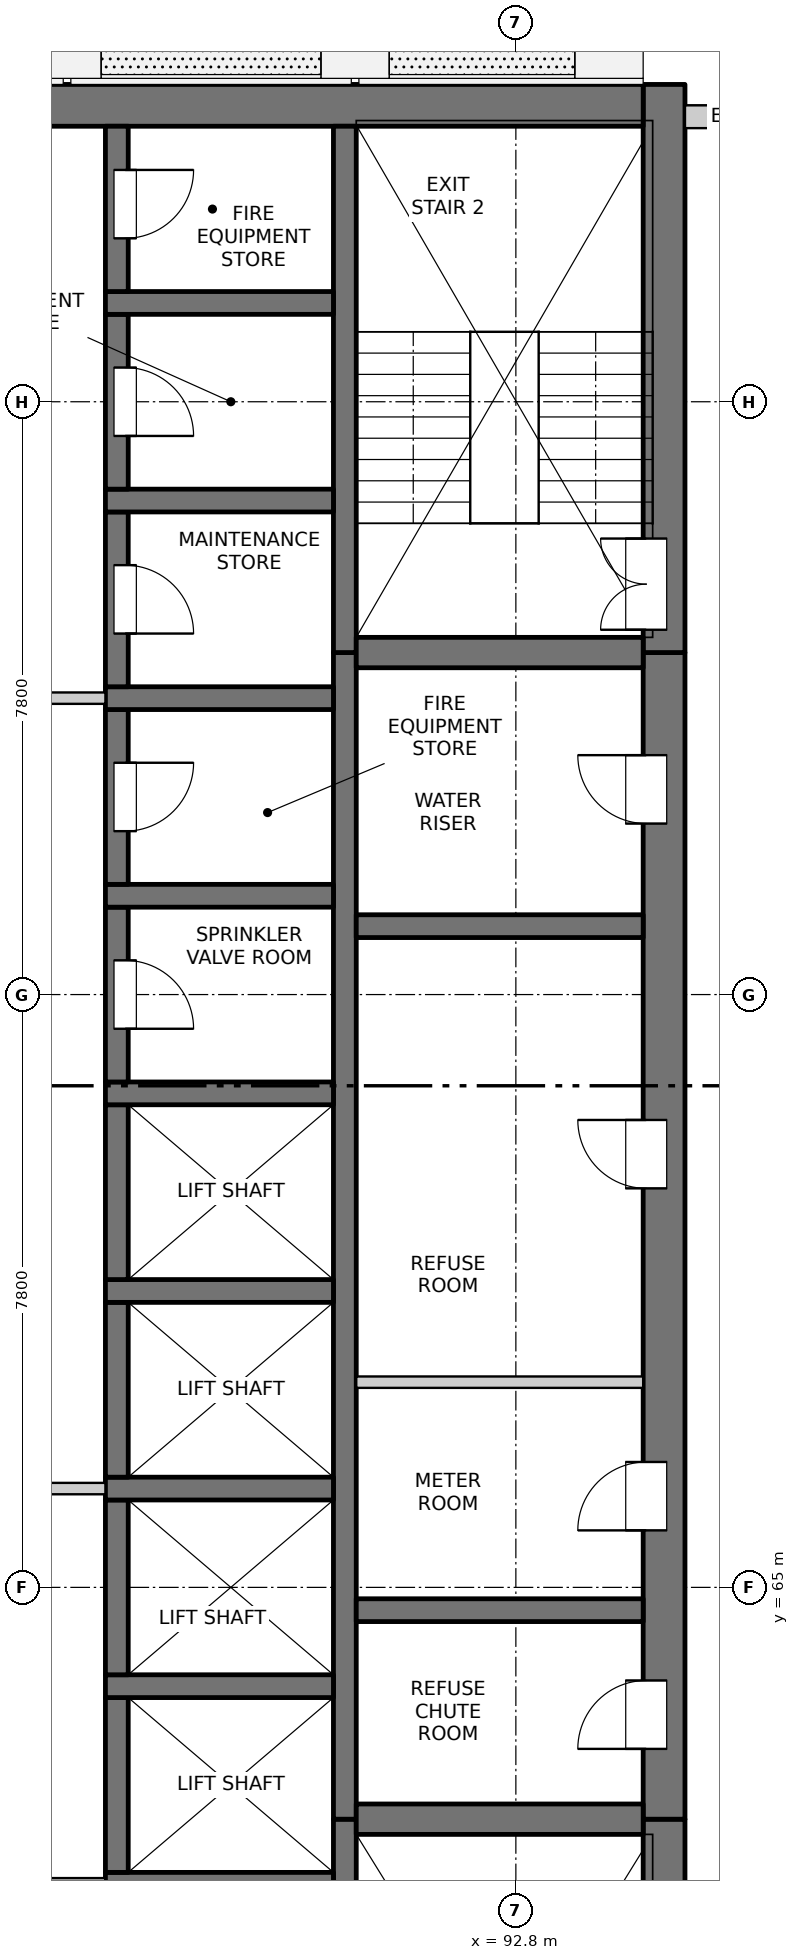
"""IFC4 building model, lengths in metres.
Left out: names, types, materials, properties, quantities, classifications, styles, units other than length and angle.
Written with IfcOpenShell. Run it as: python <this file> out.ifc"""

import sys

from ifc_helpers import new_model, si_unit, direction, frame, frame_2d, origin, place, context, subcontext, project, spatial, rectangle, extrude, element, fill, save


model = new_model("IFC4")
c1 = context("Model", 3, precision=1e-05, world=origin(), true_north=direction((0.0, 1.0)))
c2 = subcontext(c1, "Body", "Model", "MODEL_VIEW")
j1 = project(units=[si_unit("LENGTHUNIT", "METRE"), si_unit("PLANEANGLEUNIT", "RADIAN")], contexts=[c1])
p1 = place(None, origin())
s1 = spatial("IfcSite", under=j1, at=p1, CompositionType="ELEMENT")
p2 = place(p1, origin())
s2 = spatial("IfcBuilding", under=s1, at=p2, CompositionType="ELEMENT")
p3 = place(p2, frame((0.0, 0.0, 110.1)))
s3 = spatial("IfcBuildingStorey", under=s2, at=p3, CompositionType="ELEMENT", Elevation=110.1)
p4 = place(p3, frame((94.75, 54.975, -0.25), z_axis=(0.0, 0.0, 1.0), x_axis=(0.0, 1.0, 0.0)))
e1 = element("IfcWall", 1, at=p4, inside=s3, PredefinedType="SOLIDWALL", context=c2, shape_type="SweptSolid", body=[
    extrude(rectangle(XDim=6.975, YDim=0.55, at=frame_2d((3.487, 0.0))), origin(), (0.0, 0.0, 1.0), 3.4),
])
p5 = place(p4, frame((0.675, 0.0, 0.25)))
e2 = element("IfcOpeningElement", 2, at=p5, cuts=e1, PredefinedType="OPENING", context=c2, shape_type="SweptSolid", body=[
    extrude(rectangle(XDim=1.2, YDim=2.1, at=frame_2d((0.6, 1.05))), frame((0.0, 0.285, 0.0), z_axis=(0.0, -1.0, 0.0), x_axis=(1.0, 0.0, 0.0)), (0.0, 0.0, 1.0), 0.57),
])
p6 = place(p3, frame((94.75, 61.95, -0.25), z_axis=(0.0, 0.0, 1.0), x_axis=(0.0, 1.0, 0.0)))
e3 = element("IfcWall", 3, at=p6, inside=s3, PredefinedType="SOLIDWALL", context=c2, shape_type="SweptSolid", body=[
    extrude(rectangle(XDim=15.35, YDim=0.55, at=frame_2d((7.675, 0.0))), origin(), (0.0, 0.0, 1.0), 3.4),
])
p7 = place(p6, frame((0.925, 0.0, 0.25)))
e4 = element("IfcOpeningElement", 4, at=p7, cuts=e3, PredefinedType="OPENING", context=c2, shape_type="SweptSolid", body=[
    extrude(rectangle(XDim=0.9, YDim=2.1, at=frame_2d((0.45, 1.05))), frame((0.0, 0.285, 0.0), z_axis=(0.0, -1.0, 0.0), x_axis=(1.0, 0.0, 0.0)), (0.0, 0.0, 1.0), 0.57),
])
p8 = place(p6, frame((3.8, 0.0, 0.25)))
e5 = element("IfcOpeningElement", 5, at=p8, cuts=e3, PredefinedType="OPENING", context=c2, shape_type="SweptSolid", body=[
    extrude(rectangle(XDim=0.9, YDim=2.1, at=frame_2d((0.45, 1.05))), frame((0.0, 0.285, 0.0), z_axis=(0.0, -1.0, 0.0), x_axis=(1.0, 0.0, 0.0)), (0.0, 0.0, 1.0), 0.57),
])
p9 = place(p6, frame((8.3, 0.0, 0.25)))
e6 = element("IfcOpeningElement", 6, at=p9, cuts=e3, PredefinedType="OPENING", context=c2, shape_type="SweptSolid", body=[
    extrude(rectangle(XDim=0.9, YDim=2.1, at=frame_2d((0.45, 1.05))), frame((0.0, 0.285, 0.0), z_axis=(0.0, -1.0, 0.0), x_axis=(1.0, 0.0, 0.0)), (0.0, 0.0, 1.0), 0.57),
])
p10 = place(p6, frame((13.1, 0.0, 0.25)))
e7 = element("IfcOpeningElement", 7, at=p10, cuts=e3, PredefinedType="OPENING", context=c2, shape_type="SweptSolid", body=[
    extrude(rectangle(XDim=0.9, YDim=2.1, at=frame_2d((0.45, 1.05))), frame((0.0, 0.285, 0.0), z_axis=(0.0, -1.0, 0.0), x_axis=(1.0, 0.0, 0.0)), (0.0, 0.0, 1.0), 0.57),
])
p11 = place(p3, frame((94.75, 77.3, -0.25), z_axis=(0.0, 0.0, 1.0), x_axis=(0.0, 1.0, 0.0)))
e8 = element("IfcWall", 8, at=p11, inside=s3, PredefinedType="SOLIDWALL", context=c2, shape_type="SweptSolid", body=[
    extrude(rectangle(XDim=7.475, YDim=0.55, at=frame_2d((3.737, 0.0))), origin(), (0.0, 0.0, 1.0), 3.4),
])
p12 = place(p11, frame((0.3, 0.0, 0.25)))
e9 = element("IfcOpeningElement", 9, at=p12, cuts=e8, PredefinedType="OPENING", context=c2, shape_type="SweptSolid", body=[
    extrude(rectangle(XDim=1.2, YDim=2.1, at=frame_2d((0.6, 1.05))), frame((0.0, 0.285, 0.0), z_axis=(0.0, -1.0, 0.0), x_axis=(1.0, 0.0, 0.0)), (0.0, 0.0, 1.0), 0.57),
])
p13 = place(p3, frame((75.525, 84.5, -0.25), z_axis=(0.0, 0.0, 1.0), x_axis=(1.0, 0.0, 0.0)))
e10 = element("IfcWall", 10, at=p13, inside=s3, PredefinedType="SOLIDWALL", context=c2, shape_type="SweptSolid", body=[
    extrude(rectangle(XDim=18.95, YDim=0.55, at=frame_2d((9.475, 0.0))), origin(), (0.0, 0.0, 1.0), 3.4),
])
p14 = place(p3, frame((90.55, 55.525, -0.25), z_axis=(0.0, 0.0, 1.0), x_axis=(0.0, 1.0, 0.0)))
e11 = element("IfcWall", 11, at=p14, inside=s3, PredefinedType="SOLIDWALL", context=c2, shape_type="SweptSolid", body=[
    extrude(rectangle(XDim=6.425, YDim=0.3, at=frame_2d((3.212, 0.0))), origin(), (0.0, 0.0, 1.0), 3.4),
])
p15 = place(p14, frame((0.125, 0.0, 0.25)))
e12 = element("IfcOpeningElement", 12, at=p15, cuts=e11, PredefinedType="OPENING", context=c2, shape_type="SweptSolid", body=[
    extrude(rectangle(XDim=1.2, YDim=2.1, at=frame_2d((0.6, 1.05))), frame((0.0, 0.16, 0.0), z_axis=(0.0, -1.0, 0.0), x_axis=(1.0, 0.0, 0.0)), (0.0, 0.0, 1.0), 0.32),
])
p16 = place(p3, frame((90.55, 61.95, -0.25), z_axis=(0.0, 0.0, 1.0), x_axis=(0.0, 1.0, 0.0)))
e13 = element("IfcWall", 13, at=p16, inside=s3, PredefinedType="SOLIDWALL", context=c2, shape_type="SweptSolid", body=[
    extrude(rectangle(XDim=15.35, YDim=0.3, at=frame_2d((7.675, 0.0))), origin(), (0.0, 0.0, 1.0), 3.4),
])
p17 = place(p3, frame((90.55, 77.3, -0.25), z_axis=(0.0, 0.0, 1.0), x_axis=(0.0, 1.0, 0.0)))
e14 = element("IfcWall", 14, at=p17, inside=s3, PredefinedType="SOLIDWALL", context=c2, shape_type="SweptSolid", body=[
    extrude(rectangle(XDim=6.925, YDim=0.3, at=frame_2d((3.462, 0.0))), origin(), (0.0, 0.0, 1.0), 3.4),
])
p18 = place(p3, frame((87.4, 61.1, -0.25), z_axis=(0.0, 0.0, 1.0), x_axis=(1.0, 0.0, 0.0)))
e15 = element("IfcWall", 15, at=p18, inside=s3, PredefinedType="SOLIDWALL", context=c2, shape_type="SweptSolid", body=[
    extrude(rectangle(XDim=3.0, YDim=0.3, at=frame_2d((1.5, 0.0))), origin(), (0.0, 0.0, 1.0), 3.4),
])
p19 = place(p3, frame((87.55, 61.25, -0.25), z_axis=(0.0, 0.0, 1.0), x_axis=(0.0, 1.0, 0.0)))
e16 = element("IfcWall", 16, at=p19, inside=s3, PredefinedType="SOLIDWALL", context=c2, shape_type="SweptSolid", body=[
    extrude(rectangle(XDim=2.3, YDim=0.3, at=frame_2d((1.15, 0.0))), origin(), (0.0, 0.0, 1.0), 3.4),
])
p20 = place(p3, frame((87.4, 63.7, -0.25), z_axis=(0.0, 0.0, 1.0), x_axis=(1.0, 0.0, 0.0)))
e17 = element("IfcWall", 17, at=p20, inside=s3, PredefinedType="SOLIDWALL", context=c2, shape_type="SweptSolid", body=[
    extrude(rectangle(XDim=3.0, YDim=0.3, at=frame_2d((1.5, 0.0))), origin(), (0.0, 0.0, 1.0), 3.4),
])
p21 = place(p3, frame((87.55, 63.85, -0.25), z_axis=(0.0, 0.0, 1.0), x_axis=(0.0, 1.0, 0.0)))
e18 = element("IfcWall", 18, at=p21, inside=s3, PredefinedType="SOLIDWALL", context=c2, shape_type="SweptSolid", body=[
    extrude(rectangle(XDim=2.3, YDim=0.3, at=frame_2d((1.15, 0.0))), origin(), (0.0, 0.0, 1.0), 3.4),
])
p22 = place(p3, frame((87.4, 66.3, -0.25), z_axis=(0.0, 0.0, 1.0), x_axis=(1.0, 0.0, 0.0)))
e19 = element("IfcWall", 19, at=p22, inside=s3, PredefinedType="SOLIDWALL", context=c2, shape_type="SweptSolid", body=[
    extrude(rectangle(XDim=3.0, YDim=0.3, at=frame_2d((1.5, 0.0))), origin(), (0.0, 0.0, 1.0), 3.4),
])
p23 = place(p3, frame((87.55, 66.45, -0.25), z_axis=(0.0, 0.0, 1.0), x_axis=(0.0, 1.0, 0.0)))
e20 = element("IfcWall", 20, at=p23, inside=s3, PredefinedType="SOLIDWALL", context=c2, shape_type="SweptSolid", body=[
    extrude(rectangle(XDim=2.3, YDim=0.3, at=frame_2d((1.15, 0.0))), origin(), (0.0, 0.0, 1.0), 3.4),
])
p24 = place(p3, frame((87.4, 68.9, -0.25), z_axis=(0.0, 0.0, 1.0), x_axis=(1.0, 0.0, 0.0)))
e21 = element("IfcWall", 21, at=p24, inside=s3, PredefinedType="SOLIDWALL", context=c2, shape_type="SweptSolid", body=[
    extrude(rectangle(XDim=3.0, YDim=0.3, at=frame_2d((1.5, 0.0))), origin(), (0.0, 0.0, 1.0), 3.4),
])
p25 = place(p3, frame((87.55, 69.05, -0.25), z_axis=(0.0, 0.0, 1.0), x_axis=(0.0, 1.0, 0.0)))
e22 = element("IfcWall", 22, at=p25, inside=s3, PredefinedType="SOLIDWALL", context=c2, shape_type="SweptSolid", body=[
    extrude(rectangle(XDim=2.3, YDim=0.3, at=frame_2d((1.15, 0.0))), origin(), (0.0, 0.0, 1.0), 3.4),
])
p26 = place(p3, frame((87.4, 71.5, -0.25), z_axis=(0.0, 0.0, 1.0), x_axis=(1.0, 0.0, 0.0)))
e23 = element("IfcWall", 23, at=p26, inside=s3, PredefinedType="SOLIDWALL", context=c2, shape_type="SweptSolid", body=[
    extrude(rectangle(XDim=3.0, YDim=0.3, at=frame_2d((1.5, 0.0))), origin(), (0.0, 0.0, 1.0), 3.4),
])
p27 = place(p3, frame((87.55, 71.65, -0.25), z_axis=(0.0, 0.0, 1.0), x_axis=(0.0, 1.0, 0.0)))
e24 = element("IfcWall", 24, at=p27, inside=s3, PredefinedType="SOLIDWALL", context=c2, shape_type="SweptSolid", body=[
    extrude(rectangle(XDim=2.3, YDim=0.3, at=frame_2d((1.15, 0.0))), origin(), (0.0, 0.0, 1.0), 3.4),
])
p28 = place(p27, frame((0.7, 0.0, 0.25)))
e25 = element("IfcOpeningElement", 25, at=p28, cuts=e24, PredefinedType="OPENING", context=c2, shape_type="SweptSolid", body=[
    extrude(rectangle(XDim=0.9, YDim=2.1, at=frame_2d((0.45, 1.05))), frame((0.0, 0.16, 0.0), z_axis=(0.0, -1.0, 0.0), x_axis=(1.0, 0.0, 0.0)), (0.0, 0.0, 1.0), 0.32),
])
p29 = place(p3, frame((87.4, 74.1, -0.25), z_axis=(0.0, 0.0, 1.0), x_axis=(1.0, 0.0, 0.0)))
e26 = element("IfcWall", 26, at=p29, inside=s3, PredefinedType="SOLIDWALL", context=c2, shape_type="SweptSolid", body=[
    extrude(rectangle(XDim=3.0, YDim=0.3, at=frame_2d((1.5, 0.0))), origin(), (0.0, 0.0, 1.0), 3.4),
])
p30 = place(p3, frame((87.55, 74.25, -0.25), z_axis=(0.0, 0.0, 1.0), x_axis=(0.0, 1.0, 0.0)))
e27 = element("IfcWall", 27, at=p30, inside=s3, PredefinedType="SOLIDWALL", context=c2, shape_type="SweptSolid", body=[
    extrude(rectangle(XDim=2.3, YDim=0.3, at=frame_2d((1.15, 0.0))), origin(), (0.0, 0.0, 1.0), 3.4),
])
p31 = place(p30, frame((0.7, 0.0, 0.25)))
e28 = element("IfcOpeningElement", 28, at=p31, cuts=e27, PredefinedType="OPENING", context=c2, shape_type="SweptSolid", body=[
    extrude(rectangle(XDim=0.9, YDim=2.1, at=frame_2d((0.45, 1.05))), frame((0.0, 0.16, 0.0), z_axis=(0.0, -1.0, 0.0), x_axis=(1.0, 0.0, 0.0)), (0.0, 0.0, 1.0), 0.32),
])
p32 = place(p3, frame((87.4, 76.7, -0.25), z_axis=(0.0, 0.0, 1.0), x_axis=(1.0, 0.0, 0.0)))
e29 = element("IfcWall", 29, at=p32, inside=s3, PredefinedType="SOLIDWALL", context=c2, shape_type="SweptSolid", body=[
    extrude(rectangle(XDim=3.0, YDim=0.3, at=frame_2d((1.5, 0.0))), origin(), (0.0, 0.0, 1.0), 3.4),
])
p33 = place(p3, frame((87.55, 76.85, -0.25), z_axis=(0.0, 0.0, 1.0), x_axis=(0.0, 1.0, 0.0)))
e30 = element("IfcWall", 30, at=p33, inside=s3, PredefinedType="SOLIDWALL", context=c2, shape_type="SweptSolid", body=[
    extrude(rectangle(XDim=2.3, YDim=0.3, at=frame_2d((1.15, 0.0))), origin(), (0.0, 0.0, 1.0), 3.4),
])
p34 = place(p33, frame((0.7, 0.0, 0.25)))
e31 = element("IfcOpeningElement", 31, at=p34, cuts=e30, PredefinedType="OPENING", context=c2, shape_type="SweptSolid", body=[
    extrude(rectangle(XDim=0.9, YDim=2.1, at=frame_2d((0.45, 1.05))), frame((0.0, 0.16, 0.0), z_axis=(0.0, -1.0, 0.0), x_axis=(1.0, 0.0, 0.0)), (0.0, 0.0, 1.0), 0.32),
])
p35 = place(p3, frame((87.4, 79.3, -0.25), z_axis=(0.0, 0.0, 1.0), x_axis=(1.0, 0.0, 0.0)))
e32 = element("IfcWall", 32, at=p35, inside=s3, PredefinedType="SOLIDWALL", context=c2, shape_type="SweptSolid", body=[
    extrude(rectangle(XDim=3.0, YDim=0.3, at=frame_2d((1.5, 0.0))), origin(), (0.0, 0.0, 1.0), 3.4),
])
p36 = place(p3, frame((87.55, 79.45, -0.25), z_axis=(0.0, 0.0, 1.0), x_axis=(0.0, 1.0, 0.0)))
e33 = element("IfcWall", 33, at=p36, inside=s3, PredefinedType="SOLIDWALL", context=c2, shape_type="SweptSolid", body=[
    extrude(rectangle(XDim=2.3, YDim=0.3, at=frame_2d((1.15, 0.0))), origin(), (0.0, 0.0, 1.0), 3.4),
])
p37 = place(p36, frame((0.7, 0.0, 0.25)))
e34 = element("IfcOpeningElement", 34, at=p37, cuts=e33, PredefinedType="OPENING", context=c2, shape_type="SweptSolid", body=[
    extrude(rectangle(XDim=0.9, YDim=2.1, at=frame_2d((0.45, 1.05))), frame((0.0, 0.16, 0.0), z_axis=(0.0, -1.0, 0.0), x_axis=(1.0, 0.0, 0.0)), (0.0, 0.0, 1.0), 0.32),
])
p38 = place(p3, frame((87.4, 81.9, -0.25), z_axis=(0.0, 0.0, 1.0), x_axis=(1.0, 0.0, 0.0)))
e35 = element("IfcWall", 35, at=p38, inside=s3, PredefinedType="SOLIDWALL", context=c2, shape_type="SweptSolid", body=[
    extrude(rectangle(XDim=3.0, YDim=0.3, at=frame_2d((1.5, 0.0))), origin(), (0.0, 0.0, 1.0), 3.4),
])
p39 = place(p3, frame((87.55, 82.05, -0.25), z_axis=(0.0, 0.0, 1.0), x_axis=(0.0, 1.0, 0.0)))
e36 = element("IfcWall", 36, at=p39, inside=s3, PredefinedType="SOLIDWALL", context=c2, shape_type="SweptSolid", body=[
    extrude(rectangle(XDim=2.175, YDim=0.3, at=frame_2d((1.087, 0.0))), origin(), (0.0, 0.0, 1.0), 3.4),
])
p40 = place(p39, frame((0.7, 0.0, 0.25)))
e37 = element("IfcOpeningElement", 37, at=p40, cuts=e36, PredefinedType="OPENING", context=c2, shape_type="SweptSolid", body=[
    extrude(rectangle(XDim=0.9, YDim=2.1, at=frame_2d((0.45, 1.05))), frame((0.0, 0.16, 0.0), z_axis=(0.0, -1.0, 0.0), x_axis=(1.0, 0.0, 0.0)), (0.0, 0.0, 1.0), 0.32),
])
p41 = place(p3, frame((90.7, 61.95, -0.25), z_axis=(0.0, 0.0, 1.0), x_axis=(1.0, 0.0, 0.0)))
e38 = element("IfcWall", 38, at=p41, inside=s3, PredefinedType="SOLIDWALL", context=c2, shape_type="SweptSolid", body=[
    extrude(rectangle(XDim=3.775, YDim=0.4, at=frame_2d((1.888, 0.0))), origin(), (0.0, 0.0, 1.0), 3.4),
])
for number, where, z_axis, x_axis in (
    (39, (90.7, 64.7, -0.25), (0.0, 0.0, 1.0), (1.0, 0.0, 0.0)),
    (40, (90.7, 73.7, -0.25), (0.0, 0.0, 1.0), (1.0, 0.0, 0.0)),
):
    element("IfcWall", number, at=place(p3, frame(where, z_axis=z_axis, x_axis=x_axis)), inside=s3, PredefinedType="SOLIDWALL", context=c2, shape_type="SweptSolid", body=[
        extrude(rectangle(XDim=3.775, YDim=0.3, at=frame_2d((1.888, 0.0))), origin(), (0.0, 0.0, 1.0), 3.4),
    ])
p42 = place(p3, frame((90.7, 77.3, -0.25), z_axis=(0.0, 0.0, 1.0), x_axis=(1.0, 0.0, 0.0)))
e41 = element("IfcWall", 41, at=p42, inside=s3, PredefinedType="SOLIDWALL", context=c2, shape_type="SweptSolid", body=[
    extrude(rectangle(XDim=3.775, YDim=0.4, at=frame_2d((1.888, 0.0))), origin(), (0.0, 0.0, 1.0), 3.4),
])
p43 = place(p3, frame((95.025, 84.35, 0.0), z_axis=(0.0, 0.0, 1.0), x_axis=(1.0, 0.0, 0.0)))
e42 = element("IfcWall", 42, at=p43, inside=s3, PredefinedType="SOLIDWALL", context=c2, shape_type="SweptSolid", body=[
    extrude(rectangle(XDim=1.25, YDim=0.3, at=frame_2d((0.625, 0.0))), origin(), (0.0, 0.0, 1.0), 2.7),
])
p44 = place(p3, frame((82.6, 61.1, 0.0), z_axis=(0.0, 0.0, 1.0), x_axis=(1.0, 0.0, 0.0)))
e43 = element("IfcWall", 43, at=p44, inside=s3, PredefinedType="PARTITIONING", context=c2, shape_type="SweptSolid", body=[
    extrude(rectangle(XDim=4.8, YDim=0.15, at=frame_2d((2.4, 0.0))), origin(), (0.0, 0.0, 1.0), 3.15),
])
p45 = place(p44, frame((1.5, 0.0, 0.0)))
e44 = element("IfcOpeningElement", 44, at=p45, cuts=e43, PredefinedType="OPENING", context=c2, shape_type="SweptSolid", body=[
    extrude(rectangle(XDim=1.8, YDim=2.1, at=frame_2d((0.9, 1.05))), frame((0.0, 0.085, 0.0), z_axis=(0.0, -1.0, 0.0), x_axis=(1.0, 0.0, 0.0)), (0.0, 0.0, 1.0), 0.17),
])
p46 = place(p3, frame((82.6, 66.3, 0.0), z_axis=(0.0, 0.0, 1.0), x_axis=(1.0, 0.0, 0.0)))
e45 = element("IfcWall", 45, at=p46, inside=s3, PredefinedType="PARTITIONING", context=c2, shape_type="SweptSolid", body=[
    extrude(rectangle(XDim=4.8, YDim=0.15, at=frame_2d((2.4, 0.0))), origin(), (0.0, 0.0, 1.0), 3.15),
])
p47 = place(p46, frame((1.5, 0.0, 0.0)))
e46 = element("IfcOpeningElement", 46, at=p47, cuts=e45, PredefinedType="OPENING", context=c2, shape_type="SweptSolid", body=[
    extrude(rectangle(XDim=1.8, YDim=2.1, at=frame_2d((0.9, 1.05))), frame((0.0, 0.085, 0.0), z_axis=(0.0, -1.0, 0.0), x_axis=(1.0, 0.0, 0.0)), (0.0, 0.0, 1.0), 0.17),
])
p48 = place(p3, frame((90.7, 67.7, 0.0), z_axis=(0.0, 0.0, 1.0), x_axis=(1.0, 0.0, 0.0)))
e47 = element("IfcWall", 47, at=p48, inside=s3, PredefinedType="PARTITIONING", context=c2, shape_type="SweptSolid", body=[
    extrude(rectangle(XDim=3.775, YDim=0.15, at=frame_2d((1.887, 0.0))), origin(), (0.0, 0.0, 1.0), 3.15),
])
p49 = place(p3, frame((82.6, 76.7, 0.0), z_axis=(0.0, 0.0, 1.0), x_axis=(1.0, 0.0, 0.0)))
e48 = element("IfcWall", 48, at=p49, inside=s3, PredefinedType="PARTITIONING", context=c2, shape_type="SweptSolid", body=[
    extrude(rectangle(XDim=4.8, YDim=0.15, at=frame_2d((2.4, 0.0))), origin(), (0.0, 0.0, 1.0), 3.15),
])
p50 = place(p49, frame((1.5, 0.0, 0.0)))
e49 = element("IfcOpeningElement", 49, at=p50, cuts=e48, PredefinedType="OPENING", context=c2, shape_type="SweptSolid", body=[
    extrude(rectangle(XDim=1.8, YDim=2.1, at=frame_2d((0.9, 1.05))), frame((0.0, 0.085, 0.0), z_axis=(0.0, -1.0, 0.0), x_axis=(1.0, 0.0, 0.0)), (0.0, 0.0, 1.0), 0.17),
])
p51 = place(p7, origin())
e50 = element("IfcDoor", 50, at=p51, inside=s3, OperationType="SINGLE_SWING_LEFT", PredefinedType="DOOR", context=c2, shape_type="SweptSolid", body=[
    extrude(rectangle(XDim=0.9, YDim=2.1, at=frame_2d((0.45, 1.05))), frame((0.0, 0.26, 0.0), z_axis=(0.0, -1.0, 0.0), x_axis=(1.0, 0.0, 0.0)), (0.0, 0.0, 1.0), 0.05),
])
fill(e4, e50)
p52 = place(p8, origin())
e51 = element("IfcDoor", 51, at=p52, inside=s3, OperationType="SINGLE_SWING_LEFT", PredefinedType="DOOR", context=c2, shape_type="SweptSolid", body=[
    extrude(rectangle(XDim=0.9, YDim=2.1, at=frame_2d((0.45, 1.05))), frame((0.0, 0.26, 0.0), z_axis=(0.0, -1.0, 0.0), x_axis=(1.0, 0.0, 0.0)), (0.0, 0.0, 1.0), 0.05),
])
fill(e5, e51)
p53 = place(p9, origin())
e52 = element("IfcDoor", 52, at=p53, inside=s3, OperationType="SINGLE_SWING_RIGHT", PredefinedType="DOOR", context=c2, shape_type="SweptSolid", body=[
    extrude(rectangle(XDim=0.9, YDim=2.1, at=frame_2d((0.45, 1.05))), frame((0.0, 0.26, 0.0), z_axis=(0.0, -1.0, 0.0), x_axis=(1.0, 0.0, 0.0)), (0.0, 0.0, 1.0), 0.05),
])
fill(e6, e52)
p54 = place(p28, origin())
e53 = element("IfcDoor", 53, at=p54, inside=s3, OperationType="SINGLE_SWING_RIGHT", PredefinedType="DOOR", context=c2, shape_type="SweptSolid", body=[
    extrude(rectangle(XDim=0.9, YDim=2.1, at=frame_2d((0.45, 1.05))), frame((0.0, -0.085, 0.0), z_axis=(0.0, -1.0, 0.0), x_axis=(1.0, 0.0, 0.0)), (0.0, 0.0, 1.0), 0.05),
])
fill(e25, e53)
p55 = place(p31, origin())
e54 = element("IfcDoor", 54, at=p55, inside=s3, OperationType="SINGLE_SWING_LEFT", PredefinedType="DOOR", context=c2, shape_type="SweptSolid", body=[
    extrude(rectangle(XDim=0.9, YDim=2.1, at=frame_2d((0.45, 1.05))), frame((0.0, -0.085, 0.0), z_axis=(0.0, -1.0, 0.0), x_axis=(1.0, 0.0, 0.0)), (0.0, 0.0, 1.0), 0.05),
])
fill(e28, e54)
p56 = place(p10, origin())
e55 = element("IfcDoor", 55, at=p56, inside=s3, OperationType="SINGLE_SWING_RIGHT", PredefinedType="DOOR", context=c2, shape_type="SweptSolid", body=[
    extrude(rectangle(XDim=0.9, YDim=2.1, at=frame_2d((0.45, 1.05))), frame((0.0, 0.26, 0.0), z_axis=(0.0, -1.0, 0.0), x_axis=(1.0, 0.0, 0.0)), (0.0, 0.0, 1.0), 0.05),
])
fill(e7, e55)
p57 = place(p34, origin())
e56 = element("IfcDoor", 56, at=p57, inside=s3, OperationType="SINGLE_SWING_RIGHT", PredefinedType="DOOR", context=c2, shape_type="SweptSolid", body=[
    extrude(rectangle(XDim=0.9, YDim=2.1, at=frame_2d((0.45, 1.05))), frame((0.0, -0.085, 0.0), z_axis=(0.0, -1.0, 0.0), x_axis=(1.0, 0.0, 0.0)), (0.0, 0.0, 1.0), 0.05),
])
fill(e31, e56)
p58 = place(p12, origin())
e57 = element("IfcDoor", 57, at=p58, inside=s3, OperationType="DOUBLE_DOOR_SINGLE_SWING", PredefinedType="DOOR", context=c2, shape_type="SweptSolid", body=[
    extrude(rectangle(XDim=1.2, YDim=2.1, at=frame_2d((0.6, 1.05))), frame((0.0, 0.26, 0.0), z_axis=(0.0, -1.0, 0.0), x_axis=(1.0, 0.0, 0.0)), (0.0, 0.0, 1.0), 0.05),
])
fill(e9, e57)
p59 = place(p37, origin())
e58 = element("IfcDoor", 58, at=p59, inside=s3, OperationType="SINGLE_SWING_RIGHT", PredefinedType="DOOR", context=c2, shape_type="SweptSolid", body=[
    extrude(rectangle(XDim=0.9, YDim=2.1, at=frame_2d((0.45, 1.05))), frame((0.0, -0.085, 0.0), z_axis=(0.0, -1.0, 0.0), x_axis=(1.0, 0.0, 0.0)), (0.0, 0.0, 1.0), 0.05),
])
fill(e34, e58)
p60 = place(p40, origin())
e59 = element("IfcDoor", 59, at=p60, inside=s3, OperationType="SINGLE_SWING_LEFT", PredefinedType="DOOR", context=c2, shape_type="SweptSolid", body=[
    extrude(rectangle(XDim=0.9, YDim=2.1, at=frame_2d((0.45, 1.05))), frame((0.0, -0.085, 0.0), z_axis=(0.0, -1.0, 0.0), x_axis=(1.0, 0.0, 0.0)), (0.0, 0.0, 1.0), 0.05),
])
fill(e37, e59)
save(model, sys.argv[1])
